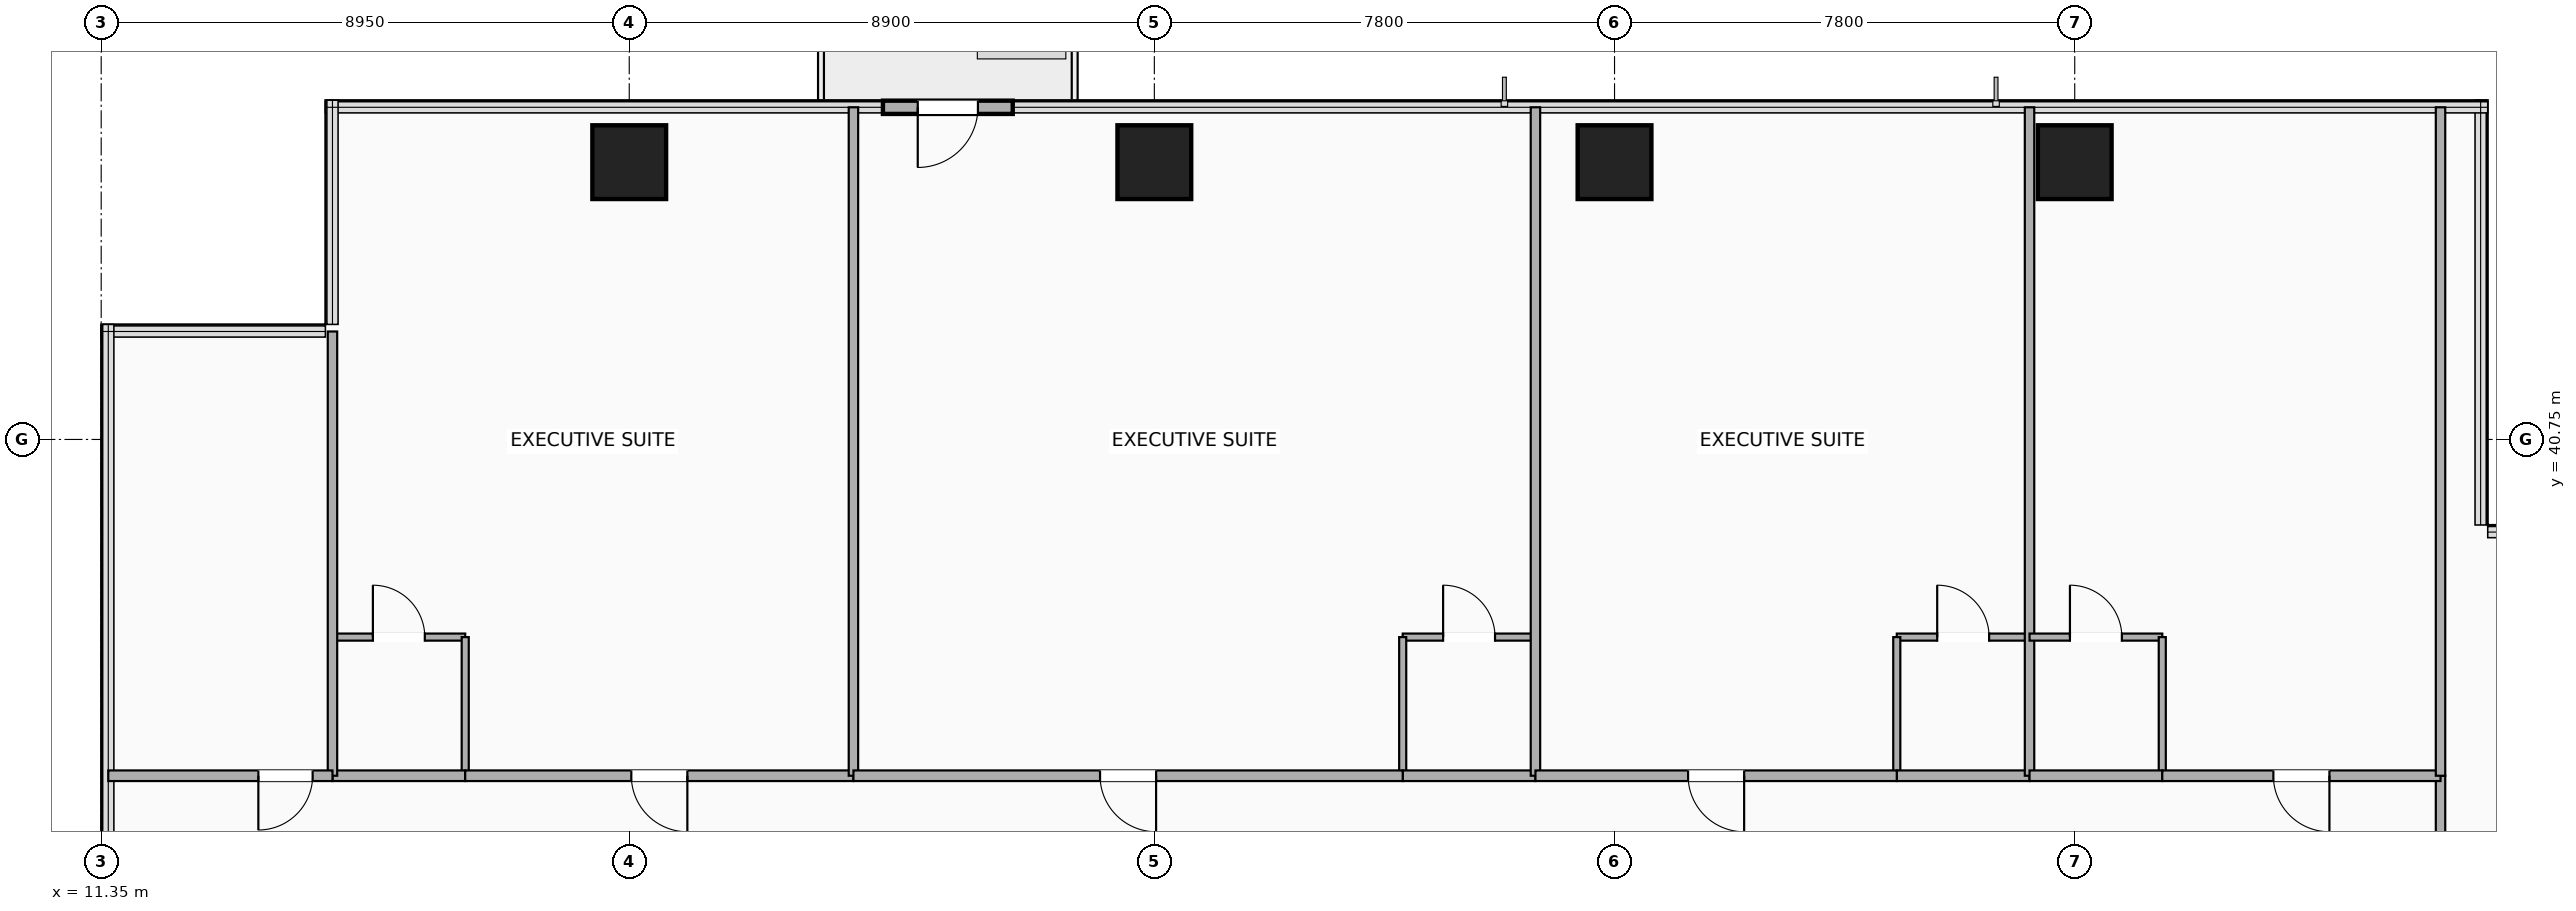
"""IFC4 building model, lengths in metres.
Left out: names, types, materials, properties, quantities, classifications, styles, units other than length and angle.
Written with IfcOpenShell. Run it as: python <this file> out.ifc"""

import sys

from ifc_helpers import new_model, si_unit, direction, frame, frame_2d, origin, origin_2d, place, context, subcontext, project, spatial, rectangle, extrude, element, fill, save


model = new_model("IFC4")
c1 = context("Model", 3, precision=1e-05, world=origin(), true_north=direction((0.0, 1.0)))
c2 = subcontext(c1, "Body", "Model", "MODEL_VIEW")
j1 = project(units=[si_unit("LENGTHUNIT", "METRE"), si_unit("PLANEANGLEUNIT", "RADIAN")], contexts=[c1])
p1 = place(None, origin())
s1 = spatial("IfcSite", under=j1, at=p1, CompositionType="ELEMENT")
p2 = place(p1, origin())
s2 = spatial("IfcBuilding", under=s1, at=p2, CompositionType="ELEMENT")
p3 = place(p2, frame((0.0, 0.0, 91.7)))
s3 = spatial("IfcBuildingStorey", under=s2, at=p3, CompositionType="ELEMENT", Elevation=91.7)
for number, where, z_axis, x_axis in (
    (1, (20.3, 45.45, -0.26), (0.0, 0.0, 1.0), (1.0, 0.0, 0.0)),
    (2, (29.2, 45.45, -0.26), (0.0, 0.0, 1.0), (1.0, 0.0, 0.0)),
    (3, (37.0, 45.45, -0.26), (0.0, 0.0, 1.0), (1.0, 0.0, 0.0)),
    (4, (44.8, 45.45, -0.26), (0.0, 0.0, 1.0), (1.0, 0.0, 0.0)),
):
    element("IfcColumn", number, at=place(p3, frame(where, z_axis=z_axis, x_axis=x_axis)), inside=s3, PredefinedType="COLUMN", context=c2, shape_type="SweptSolid", body=[
        extrude(rectangle(XDim=1.25, YDim=1.25, at=origin_2d()), origin(), (0.0, 0.0, 1.0), 3.5),
    ])
p4 = place(p3, frame((24.6, 46.38, 0.0), z_axis=(0.0, 0.0, 1.0), x_axis=(1.0, 0.0, 0.0)))
e5 = element("IfcWall", 5, at=p4, inside=s3, PredefinedType="SOLIDWALL", context=c2, shape_type="SweptSolid", body=[
    extrude(rectangle(XDim=2.2, YDim=0.225, at=frame_2d((1.1, 0.0))), origin(), (0.0, 0.0, 1.0), 3.24),
])
p5 = place(p4, frame((0.59, 0.0, 0.0)))
e6 = element("IfcOpeningElement", 6, at=p5, cuts=e5, PredefinedType="OPENING", context=c2, shape_type="SweptSolid", body=[
    extrude(rectangle(XDim=1.02, YDim=2.1, at=frame_2d((0.51, 1.05))), frame((0.0, 0.123, 0.0), z_axis=(0.0, -1.0, 0.0), x_axis=(1.0, 0.0, 0.0)), (0.0, 0.0, 1.0), 0.245),
])
p6 = place(p3, frame((51.0, 33.0, 0.0), z_axis=(0.0, 0.0, 1.0), x_axis=(0.0, 1.0, 0.0)))
e7 = element("IfcWall", 7, at=p6, inside=s3, PredefinedType="PARTITIONING", context=c2, shape_type="SweptSolid", body=[
    extrude(rectangle(XDim=2.05, YDim=0.16, at=frame_2d((1.025, 0.0))), origin(), (0.0, 0.0, 1.0), 2.313),
])
p7 = place(p3, frame((15.27, 37.4, 0.0), z_axis=(0.0, 0.0, 1.0), x_axis=(1.0, 0.0, 0.0)))
e8 = element("IfcWall", 8, at=p7, inside=s3, PredefinedType="PARTITIONING", context=c2, shape_type="SweptSolid", body=[
    extrude(rectangle(XDim=2.25, YDim=0.12, at=frame_2d((1.125, 0.0))), origin(), (0.0, 0.0, 1.0), 3.24),
])
p8 = place(p7, frame((1.565, 0.0, 0.0), z_axis=(0.0, 0.0, 1.0), x_axis=(-1.0, 0.0, 0.0)))
e9 = element("IfcOpeningElement", 9, at=p8, cuts=e8, PredefinedType="OPENING", context=c2, shape_type="SweptSolid", body=[
    extrude(rectangle(XDim=0.88, YDim=2.08, at=frame_2d((0.44, 1.04))), frame((0.0, 0.07, 0.0), z_axis=(0.0, -1.0, 0.0), x_axis=(1.0, 0.0, 0.0)), (0.0, 0.0, 1.0), 0.14),
])
p9 = place(p3, frame((17.52, 35.05, 0.0), z_axis=(0.0, 0.0, 1.0), x_axis=(0.0, 1.0, 0.0)))
e10 = element("IfcWall", 10, at=p9, inside=s3, PredefinedType="PARTITIONING", context=c2, shape_type="SweptSolid", body=[
    extrude(rectangle(XDim=2.35, YDim=0.12, at=frame_2d((1.175, 0.0))), origin(), (0.0, 0.0, 1.0), 3.24),
])
p10 = place(p3, frame((15.27, 35.05, 0.0), z_axis=(0.0, 0.0, 1.0), x_axis=(1.0, 0.0, 0.0)))
e11 = element("IfcWall", 11, at=p10, inside=s3, PredefinedType="PARTITIONING", context=c2, shape_type="SweptSolid", body=[
    extrude(rectangle(XDim=2.25, YDim=0.18, at=frame_2d((1.125, 0.0))), origin(), (0.0, 0.0, 1.0), 3.24),
])
p11 = place(p3, frame((17.52, 35.05, 0.0), z_axis=(0.0, 0.0, 1.0), x_axis=(1.0, 0.0, 0.0)))
e12 = element("IfcWall", 12, at=p11, inside=s3, PredefinedType="PARTITIONING", context=c2, shape_type="SweptSolid", body=[
    extrude(rectangle(XDim=6.58, YDim=0.18, at=frame_2d((3.29, 0.0))), origin(), (0.0, 0.0, 1.0), 2.313),
])
p12 = place(p11, frame((2.815, 0.0, 0.0)))
e13 = element("IfcOpeningElement", 13, at=p12, cuts=e12, PredefinedType="OPENING", context=c2, shape_type="SweptSolid", body=[
    extrude(rectangle(XDim=0.95, YDim=2.15, at=frame_2d((0.475, 1.075))), frame((0.0, 0.1, 0.0), z_axis=(0.0, -1.0, 0.0), x_axis=(1.0, 0.0, 0.0)), (0.0, 0.0, 1.0), 0.2),
])
p13 = place(p3, frame((15.27, 35.05, 0.0), z_axis=(0.0, 0.0, 1.0), x_axis=(0.0, 1.0, 0.0)))
e14 = element("IfcWall", 14, at=p13, inside=s3, PredefinedType="PARTITIONING", context=c2, shape_type="SweptSolid", body=[
    extrude(rectangle(XDim=7.53, YDim=0.16, at=frame_2d((3.765, 0.0))), origin(), (0.0, 0.0, 1.0), 3.24),
])
p14 = place(p3, frame((24.1, 35.05, 0.0), z_axis=(0.0, 0.0, 1.0), x_axis=(0.0, 1.0, 0.0)))
e15 = element("IfcWall", 15, at=p14, inside=s3, PredefinedType="PARTITIONING", context=c2, shape_type="SweptSolid", body=[
    extrude(rectangle(XDim=11.33, YDim=0.16, at=frame_2d((5.665, 0.0))), origin(), (0.0, 0.0, 1.0), 2.603),
])
p15 = place(p3, frame((33.41, 37.4, 0.0), z_axis=(0.0, 0.0, 1.0), x_axis=(1.0, 0.0, 0.0)))
e16 = element("IfcWall", 16, at=p15, inside=s3, PredefinedType="PARTITIONING", context=c2, shape_type="SweptSolid", body=[
    extrude(rectangle(XDim=2.25, YDim=0.12, at=frame_2d((1.125, 0.0))), origin(), (0.0, 0.0, 1.0), 3.24),
])
p16 = place(p15, frame((1.565, 0.0, 0.0), z_axis=(0.0, 0.0, 1.0), x_axis=(-1.0, 0.0, 0.0)))
e17 = element("IfcOpeningElement", 17, at=p16, cuts=e16, PredefinedType="OPENING", context=c2, shape_type="SweptSolid", body=[
    extrude(rectangle(XDim=0.88, YDim=2.08, at=frame_2d((0.44, 1.04))), frame((0.0, 0.07, 0.0), z_axis=(0.0, -1.0, 0.0), x_axis=(1.0, 0.0, 0.0)), (0.0, 0.0, 1.0), 0.14),
])
p17 = place(p3, frame((33.41, 35.05, 0.0), z_axis=(0.0, 0.0, 1.0), x_axis=(0.0, 1.0, 0.0)))
e18 = element("IfcWall", 18, at=p17, inside=s3, PredefinedType="PARTITIONING", context=c2, shape_type="SweptSolid", body=[
    extrude(rectangle(XDim=2.35, YDim=0.12, at=frame_2d((1.175, 0.0))), origin(), (0.0, 0.0, 1.0), 2.922),
])
p18 = place(p3, frame((33.41, 35.05, 0.0), z_axis=(0.0, 0.0, 1.0), x_axis=(1.0, 0.0, 0.0)))
e19 = element("IfcWall", 19, at=p18, inside=s3, PredefinedType="PARTITIONING", context=c2, shape_type="SweptSolid", body=[
    extrude(rectangle(XDim=2.25, YDim=0.18, at=frame_2d((1.125, 0.0))), origin(), (0.0, 0.0, 1.0), 3.24),
])
p19 = place(p3, frame((24.1, 35.05, 0.0), z_axis=(0.0, 0.0, 1.0), x_axis=(1.0, 0.0, 0.0)))
e20 = element("IfcWall", 20, at=p19, inside=s3, PredefinedType="PARTITIONING", context=c2, shape_type="SweptSolid", body=[
    extrude(rectangle(XDim=9.31, YDim=0.18, at=frame_2d((4.655, 0.0))), origin(), (0.0, 0.0, 1.0), 2.313),
])
p20 = place(p19, frame((4.18, 0.0, 0.0)))
e21 = element("IfcOpeningElement", 21, at=p20, cuts=e20, PredefinedType="OPENING", context=c2, shape_type="SweptSolid", body=[
    extrude(rectangle(XDim=0.95, YDim=2.15, at=frame_2d((0.475, 1.075))), frame((0.0, 0.1, 0.0), z_axis=(0.0, -1.0, 0.0), x_axis=(1.0, 0.0, 0.0)), (0.0, 0.0, 1.0), 0.2),
])
p21 = place(p3, frame((35.66, 35.05, 0.0), z_axis=(0.0, 0.0, 1.0), x_axis=(0.0, 1.0, 0.0)))
e22 = element("IfcWall", 22, at=p21, inside=s3, PredefinedType="PARTITIONING", context=c2, shape_type="SweptSolid", body=[
    extrude(rectangle(XDim=11.33, YDim=0.16, at=frame_2d((5.665, 0.0))), origin(), (0.0, 0.0, 1.0), 2.603),
])
p22 = place(p3, frame((41.784, 37.4, 0.0), z_axis=(0.0, 0.0, 1.0), x_axis=(1.0, 0.0, 0.0)))
e23 = element("IfcWall", 23, at=p22, inside=s3, PredefinedType="PARTITIONING", context=c2, shape_type="SweptSolid", body=[
    extrude(rectangle(XDim=2.25, YDim=0.12, at=frame_2d((1.125, 0.0))), origin(), (0.0, 0.0, 1.0), 3.24),
])
p23 = place(p22, frame((1.565, 0.0, 0.0), z_axis=(0.0, 0.0, 1.0), x_axis=(-1.0, 0.0, 0.0)))
e24 = element("IfcOpeningElement", 24, at=p23, cuts=e23, PredefinedType="OPENING", context=c2, shape_type="SweptSolid", body=[
    extrude(rectangle(XDim=0.88, YDim=2.08, at=frame_2d((0.44, 1.04))), frame((0.0, 0.07, 0.0), z_axis=(0.0, -1.0, 0.0), x_axis=(1.0, 0.0, 0.0)), (0.0, 0.0, 1.0), 0.14),
])
p24 = place(p3, frame((41.784, 35.05, 0.0), z_axis=(0.0, 0.0, 1.0), x_axis=(0.0, 1.0, 0.0)))
e25 = element("IfcWall", 25, at=p24, inside=s3, PredefinedType="PARTITIONING", context=c2, shape_type="SweptSolid", body=[
    extrude(rectangle(XDim=2.35, YDim=0.12, at=frame_2d((1.175, 0.0))), origin(), (0.0, 0.0, 1.0), 2.922),
])
p25 = place(p3, frame((41.784, 35.05, 0.0), z_axis=(0.0, 0.0, 1.0), x_axis=(1.0, 0.0, 0.0)))
e26 = element("IfcWall", 26, at=p25, inside=s3, PredefinedType="PARTITIONING", context=c2, shape_type="SweptSolid", body=[
    extrude(rectangle(XDim=2.25, YDim=0.18, at=frame_2d((1.125, 0.0))), origin(), (0.0, 0.0, 1.0), 3.24),
])
p26 = place(p3, frame((35.66, 35.05, 0.0), z_axis=(0.0, 0.0, 1.0), x_axis=(1.0, 0.0, 0.0)))
e27 = element("IfcWall", 27, at=p26, inside=s3, PredefinedType="PARTITIONING", context=c2, shape_type="SweptSolid", body=[
    extrude(rectangle(XDim=6.124, YDim=0.18, at=frame_2d((3.062, 0.0))), origin(), (0.0, 0.0, 1.0), 2.313),
])
p27 = place(p26, frame((2.587, 0.0, 0.0)))
e28 = element("IfcOpeningElement", 28, at=p27, cuts=e27, PredefinedType="OPENING", context=c2, shape_type="SweptSolid", body=[
    extrude(rectangle(XDim=0.95, YDim=2.15, at=frame_2d((0.475, 1.075))), frame((0.0, 0.1, 0.0), z_axis=(0.0, -1.0, 0.0), x_axis=(1.0, 0.0, 0.0)), (0.0, 0.0, 1.0), 0.2),
])
p28 = place(p3, frame((44.034, 35.05, 0.0), z_axis=(0.0, 0.0, 1.0), x_axis=(0.0, 1.0, 0.0)))
e29 = element("IfcWall", 29, at=p28, inside=s3, PredefinedType="PARTITIONING", context=c2, shape_type="SweptSolid", body=[
    extrude(rectangle(XDim=11.33, YDim=0.16, at=frame_2d((5.665, 0.0))), origin(), (0.0, 0.0, 1.0), 2.603),
])
p29 = place(p3, frame((44.034, 37.4, 0.0), z_axis=(0.0, 0.0, 1.0), x_axis=(1.0, 0.0, 0.0)))
e30 = element("IfcWall", 30, at=p29, inside=s3, PredefinedType="PARTITIONING", context=c2, shape_type="SweptSolid", body=[
    extrude(rectangle(XDim=2.25, YDim=0.12, at=frame_2d((1.125, 0.0))), origin(), (0.0, 0.0, 1.0), 2.313),
])
p30 = place(p29, frame((1.565, 0.0, 0.0), z_axis=(0.0, 0.0, 1.0), x_axis=(-1.0, 0.0, 0.0)))
e31 = element("IfcOpeningElement", 31, at=p30, cuts=e30, PredefinedType="OPENING", context=c2, shape_type="SweptSolid", body=[
    extrude(rectangle(XDim=0.88, YDim=2.08, at=frame_2d((0.44, 1.04))), frame((0.0, 0.07, 0.0), z_axis=(0.0, -1.0, 0.0), x_axis=(1.0, 0.0, 0.0)), (0.0, 0.0, 1.0), 0.14),
])
p31 = place(p3, frame((46.284, 35.05, 0.0), z_axis=(0.0, 0.0, 1.0), x_axis=(0.0, 1.0, 0.0)))
e32 = element("IfcWall", 32, at=p31, inside=s3, PredefinedType="PARTITIONING", context=c2, shape_type="SweptSolid", body=[
    extrude(rectangle(XDim=2.35, YDim=0.12, at=frame_2d((1.175, 0.0))), origin(), (0.0, 0.0, 1.0), 3.24),
])
p32 = place(p3, frame((44.034, 35.05, 0.0), z_axis=(0.0, 0.0, 1.0), x_axis=(1.0, 0.0, 0.0)))
e33 = element("IfcWall", 33, at=p32, inside=s3, PredefinedType="PARTITIONING", context=c2, shape_type="SweptSolid", body=[
    extrude(rectangle(XDim=2.25, YDim=0.18, at=frame_2d((1.125, 0.0))), origin(), (0.0, 0.0, 1.0), 2.313),
])
p33 = place(p3, frame((46.284, 35.05, 0.0), z_axis=(0.0, 0.0, 1.0), x_axis=(1.0, 0.0, 0.0)))
e34 = element("IfcWall", 34, at=p33, inside=s3, PredefinedType="PARTITIONING", context=c2, shape_type="SweptSolid", body=[
    extrude(rectangle(XDim=4.716, YDim=0.18, at=frame_2d((2.358, 0.0))), origin(), (0.0, 0.0, 1.0), 3.24),
])
p34 = place(p33, frame((1.883, 0.0, 0.0)))
e35 = element("IfcOpeningElement", 35, at=p34, cuts=e34, PredefinedType="OPENING", context=c2, shape_type="SweptSolid", body=[
    extrude(rectangle(XDim=0.95, YDim=2.15, at=frame_2d((0.475, 1.075))), frame((0.0, 0.1, 0.0), z_axis=(0.0, -1.0, 0.0), x_axis=(1.0, 0.0, 0.0)), (0.0, 0.0, 1.0), 0.2),
])
p35 = place(p3, frame((51.0, 35.05, 0.0), z_axis=(0.0, 0.0, 1.0), x_axis=(0.0, 1.0, 0.0)))
e36 = element("IfcWall", 36, at=p35, inside=s3, PredefinedType="PARTITIONING", context=c2, shape_type="SweptSolid", body=[
    extrude(rectangle(XDim=11.33, YDim=0.16, at=frame_2d((5.665, 0.0))), origin(), (0.0, 0.0, 1.0), 3.24),
])
p36 = place(p3, frame((11.47, 35.05, 0.0), z_axis=(0.0, 0.0, 1.0), x_axis=(1.0, 0.0, 0.0)))
e37 = element("IfcWall", 37, at=p36, inside=s3, PredefinedType="PARTITIONING", context=c2, shape_type="SweptSolid", body=[
    extrude(rectangle(XDim=3.8, YDim=0.18, at=frame_2d((1.9, 0.0))), origin(), (0.0, 0.0, 1.0), 3.24),
])
p37 = place(p36, frame((2.544, 0.0, 0.0)))
e38 = element("IfcOpeningElement", 38, at=p37, cuts=e37, PredefinedType="OPENING", context=c2, shape_type="SweptSolid", body=[
    extrude(rectangle(XDim=0.92, YDim=2.08, at=frame_2d((0.46, 1.04))), frame((0.0, 0.1, 0.0), z_axis=(0.0, -1.0, 0.0), x_axis=(1.0, 0.0, 0.0)), (0.0, 0.0, 1.0), 0.2),
])
p38 = place(p5, origin())
e39 = element("IfcDoor", 39, at=p38, inside=s3, OperationType="SINGLE_SWING_LEFT", PredefinedType="DOOR", context=c2, shape_type="SweptSolid", body=[
    extrude(rectangle(XDim=1.02, YDim=2.1, at=frame_2d((0.51, 1.05))), frame((0.0, 0.025, 0.0), z_axis=(0.0, -1.0, 0.0), x_axis=(1.0, 0.0, 0.0)), (0.0, 0.0, 1.0), 0.05),
])
fill(e6, e39)
p39 = place(p8, origin())
e40 = element("IfcDoor", 40, at=p39, inside=s3, OperationType="SINGLE_SWING_LEFT", PredefinedType="DOOR", context=c2, shape_type="SweptSolid", body=[
    extrude(rectangle(XDim=0.88, YDim=2.08, at=frame_2d((0.44, 1.04))), frame((0.0, 0.025, 0.0), z_axis=(0.0, -1.0, 0.0), x_axis=(1.0, 0.0, 0.0)), (0.0, 0.0, 1.0), 0.05),
])
fill(e9, e40)
p40 = place(p12, origin())
e41 = element("IfcDoor", 41, at=p40, inside=s3, OperationType="SINGLE_SWING_RIGHT", PredefinedType="DOOR", context=c2, shape_type="SweptSolid", body=[
    extrude(rectangle(XDim=0.95, YDim=2.15, at=frame_2d((0.475, 1.075))), frame((0.0, 0.025, 0.0), z_axis=(0.0, -1.0, 0.0), x_axis=(1.0, 0.0, 0.0)), (0.0, 0.0, 1.0), 0.05),
])
fill(e13, e41)
p41 = place(p16, origin())
e42 = element("IfcDoor", 42, at=p41, inside=s3, OperationType="SINGLE_SWING_LEFT", PredefinedType="DOOR", context=c2, shape_type="SweptSolid", body=[
    extrude(rectangle(XDim=0.88, YDim=2.08, at=frame_2d((0.44, 1.04))), frame((0.0, 0.025, 0.0), z_axis=(0.0, -1.0, 0.0), x_axis=(1.0, 0.0, 0.0)), (0.0, 0.0, 1.0), 0.05),
])
fill(e17, e42)
p42 = place(p20, origin())
e43 = element("IfcDoor", 43, at=p42, inside=s3, OperationType="SINGLE_SWING_RIGHT", PredefinedType="DOOR", context=c2, shape_type="SweptSolid", body=[
    extrude(rectangle(XDim=0.95, YDim=2.15, at=frame_2d((0.475, 1.075))), frame((0.0, 0.025, 0.0), z_axis=(0.0, -1.0, 0.0), x_axis=(1.0, 0.0, 0.0)), (0.0, 0.0, 1.0), 0.05),
])
fill(e21, e43)
p43 = place(p23, origin())
e44 = element("IfcDoor", 44, at=p43, inside=s3, OperationType="SINGLE_SWING_LEFT", PredefinedType="DOOR", context=c2, shape_type="SweptSolid", body=[
    extrude(rectangle(XDim=0.88, YDim=2.08, at=frame_2d((0.44, 1.04))), frame((0.0, 0.025, 0.0), z_axis=(0.0, -1.0, 0.0), x_axis=(1.0, 0.0, 0.0)), (0.0, 0.0, 1.0), 0.05),
])
fill(e24, e44)
p44 = place(p27, origin())
e45 = element("IfcDoor", 45, at=p44, inside=s3, OperationType="SINGLE_SWING_RIGHT", PredefinedType="DOOR", context=c2, shape_type="SweptSolid", body=[
    extrude(rectangle(XDim=0.95, YDim=2.15, at=frame_2d((0.475, 1.075))), frame((0.0, 0.025, 0.0), z_axis=(0.0, -1.0, 0.0), x_axis=(1.0, 0.0, 0.0)), (0.0, 0.0, 1.0), 0.05),
])
fill(e28, e45)
p45 = place(p30, origin())
e46 = element("IfcDoor", 46, at=p45, inside=s3, OperationType="SINGLE_SWING_LEFT", PredefinedType="DOOR", context=c2, shape_type="SweptSolid", body=[
    extrude(rectangle(XDim=0.88, YDim=2.08, at=frame_2d((0.44, 1.04))), frame((0.0, 0.025, 0.0), z_axis=(0.0, -1.0, 0.0), x_axis=(1.0, 0.0, 0.0)), (0.0, 0.0, 1.0), 0.05),
])
fill(e31, e46)
p46 = place(p34, origin())
e47 = element("IfcDoor", 47, at=p46, inside=s3, OperationType="SINGLE_SWING_RIGHT", PredefinedType="DOOR", context=c2, shape_type="SweptSolid", body=[
    extrude(rectangle(XDim=0.95, YDim=2.15, at=frame_2d((0.475, 1.075))), frame((0.0, 0.025, 0.0), z_axis=(0.0, -1.0, 0.0), x_axis=(1.0, 0.0, 0.0)), (0.0, 0.0, 1.0), 0.05),
])
fill(e35, e47)
p47 = place(p37, origin())
e48 = element("IfcDoor", 48, at=p47, inside=s3, OperationType="SINGLE_SWING_LEFT", PredefinedType="DOOR", context=c2, shape_type="SweptSolid", body=[
    extrude(rectangle(XDim=0.92, YDim=2.08, at=frame_2d((0.46, 1.04))), frame((0.0, 0.025, 0.0), z_axis=(0.0, -1.0, 0.0), x_axis=(1.0, 0.0, 0.0)), (0.0, 0.0, 1.0), 0.05),
])
fill(e38, e48)
save(model, sys.argv[1])
